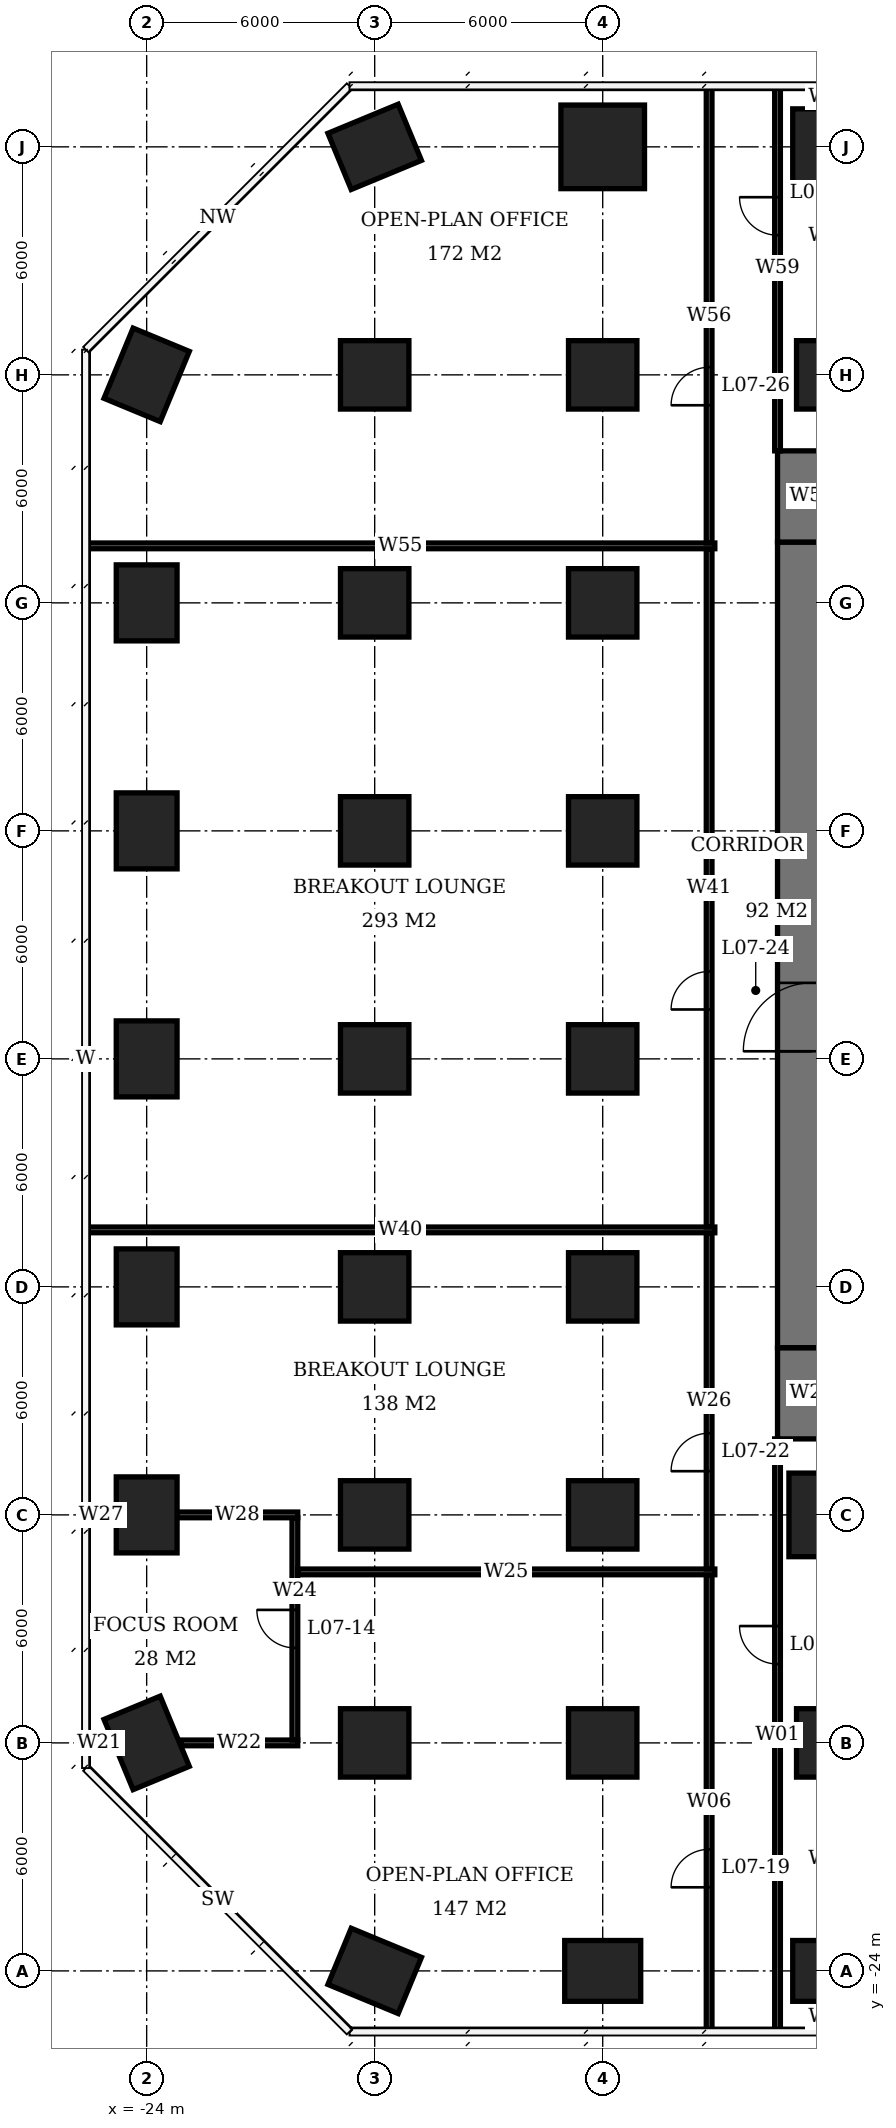
"""IFC4 building model, lengths in metres.
Left out: names, types, materials, properties, quantities, classifications, styles, units other than length and angle.
Written with IfcOpenShell. Run it as: python <this file> out.ifc"""

import sys

from ifc_helpers import new_model, si_unit, direction, frame, frame_2d, origin, origin_2d, place, context, subcontext, project, spatial, rectangle, extrude, element, fill, save


model = new_model("IFC4")
c1 = context("Model", 3, precision=1e-05, world=origin(), true_north=direction((0.0, 1.0)))
c2 = subcontext(c1, "Body", "Model", "MODEL_VIEW")
j1 = project(units=[si_unit("LENGTHUNIT", "METRE"), si_unit("PLANEANGLEUNIT", "RADIAN")], contexts=[c1])
p1 = place(None, origin())
s1 = spatial("IfcSite", under=j1, at=p1, CompositionType="ELEMENT")
p2 = place(p1, origin())
s2 = spatial("IfcBuilding", under=s1, at=p2, CompositionType="ELEMENT")
p3 = place(p2, frame((0.0, 0.0, 33.8)))
s3 = spatial("IfcBuildingStorey", under=s2, at=p3, CompositionType="ELEMENT", Elevation=33.8)
for number, where, z_axis, x_axis in (
    (1, (-24.0, -18.0, 0.0), (0.0, 0.0, 1.0), (-0.383, 0.924, 0.0)),
    (2, (-24.0, -12.0, 0.0), (0.0, 0.0, 1.0), (0.0, 1.0, 0.0)),
    (3, (-24.0, -6.0, 0.0), (0.0, 0.0, 1.0), (0.0, 1.0, 0.0)),
    (4, (-24.0, 0.0, 0.0), (0.0, 0.0, 1.0), (0.0, 1.0, 0.0)),
    (5, (-24.0, 6.0, 0.0), (0.0, 0.0, 1.0), (0.0, 1.0, 0.0)),
    (6, (-24.0, 12.0, 0.0), (0.0, 0.0, 1.0), (0.0, 1.0, 0.0)),
    (7, (-24.0, 18.0, 0.0), (0.0, 0.0, 1.0), (0.383, 0.924, 0.0)),
    (8, (-18.0, -24.0, 0.0), (0.0, 0.0, 1.0), (-0.924, 0.383, 0.0)),
):
    element("IfcColumn", number, at=place(p3, frame(where, z_axis=z_axis, x_axis=x_axis)), inside=s3, PredefinedType="COLUMN", context=c2, shape_type="SweptSolid", body=[
        extrude(rectangle(XDim=2.0, YDim=1.6, at=origin_2d()), origin(), (0.0, 0.0, 1.0), 3.9),
    ])
for number, where, z_axis, x_axis in (
    (9, (-18.0, -18.0, 0.0), (0.0, 0.0, 1.0), (1.0, 0.0, 0.0)),
    (10, (-18.0, -12.0, 0.0), (0.0, 0.0, 1.0), (1.0, 0.0, 0.0)),
    (11, (-18.0, -6.0, 0.0), (0.0, 0.0, 1.0), (1.0, 0.0, 0.0)),
    (12, (-18.0, 0.0, 0.0), (0.0, 0.0, 1.0), (1.0, 0.0, 0.0)),
    (13, (-18.0, 6.0, 0.0), (0.0, 0.0, 1.0), (1.0, 0.0, 0.0)),
    (14, (-18.0, 12.0, 0.0), (0.0, 0.0, 1.0), (1.0, 0.0, 0.0)),
    (15, (-18.0, 18.0, 0.0), (0.0, 0.0, 1.0), (1.0, 0.0, 0.0)),
):
    element("IfcColumn", number, at=place(p3, frame(where, z_axis=z_axis, x_axis=x_axis)), inside=s3, PredefinedType="COLUMN", context=c2, shape_type="SweptSolid", body=[
        extrude(rectangle(XDim=1.8, YDim=1.8, at=origin_2d()), origin(), (0.0, 0.0, 1.0), 3.9),
    ])
for number, where, z_axis, x_axis in (
    (16, (-18.0, 24.0, 0.0), (0.0, 0.0, 1.0), (0.924, 0.383, 0.0)),
    (17, (-12.0, -24.0, 0.0), (0.0, 0.0, 1.0), (1.0, 0.0, 0.0)),
):
    element("IfcColumn", number, at=place(p3, frame(where, z_axis=z_axis, x_axis=x_axis)), inside=s3, PredefinedType="COLUMN", context=c2, shape_type="SweptSolid", body=[
        extrude(rectangle(XDim=2.0, YDim=1.6, at=origin_2d()), origin(), (0.0, 0.0, 1.0), 3.9),
    ])
for number, where, z_axis, x_axis in (
    (18, (-12.0, -18.0, 0.0), (0.0, 0.0, 1.0), (1.0, 0.0, 0.0)),
    (19, (-12.0, -12.0, 0.0), (0.0, 0.0, 1.0), (1.0, 0.0, 0.0)),
    (20, (-12.0, -6.0, 0.0), (0.0, 0.0, 1.0), (1.0, 0.0, 0.0)),
    (21, (-12.0, 0.0, 0.0), (0.0, 0.0, 1.0), (1.0, 0.0, 0.0)),
    (22, (-12.0, 6.0, 0.0), (0.0, 0.0, 1.0), (1.0, 0.0, 0.0)),
    (23, (-12.0, 12.0, 0.0), (0.0, 0.0, 1.0), (1.0, 0.0, 0.0)),
    (24, (-12.0, 18.0, 0.0), (0.0, 0.0, 1.0), (1.0, 0.0, 0.0)),
):
    element("IfcColumn", number, at=place(p3, frame(where, z_axis=z_axis, x_axis=x_axis)), inside=s3, PredefinedType="COLUMN", context=c2, shape_type="SweptSolid", body=[
        extrude(rectangle(XDim=1.8, YDim=1.8, at=origin_2d()), origin(), (0.0, 0.0, 1.0), 3.9),
    ])
p4 = place(p3, frame((-12.0, 24.0, 0.0), z_axis=(0.0, 0.0, 1.0), x_axis=(1.0, 0.0, 0.0)))
e25 = element("IfcColumn", 25, at=p4, inside=s3, PredefinedType="COLUMN", context=c2, shape_type="SweptSolid", body=[
    extrude(rectangle(XDim=2.2, YDim=2.2, at=origin_2d()), origin(), (0.0, 0.0, 1.0), 3.9),
])
p5 = place(p3, frame((-6.0, -24.0, 0.0), z_axis=(0.0, 0.0, 1.0), x_axis=(1.0, 0.0, 0.0)))
e26 = element("IfcColumn", 26, at=p5, inside=s3, PredefinedType="COLUMN", context=c2, shape_type="SweptSolid", body=[
    extrude(rectangle(XDim=2.0, YDim=1.6, at=origin_2d()), origin(), (0.0, 0.0, 1.0), 3.9),
])
p6 = place(p3, frame((-6.0, -18.0, 0.0), z_axis=(0.0, 0.0, 1.0), x_axis=(1.0, 0.0, 0.0)))
e27 = element("IfcColumn", 27, at=p6, inside=s3, PredefinedType="COLUMN", context=c2, shape_type="SweptSolid", body=[
    extrude(rectangle(XDim=1.8, YDim=1.8, at=origin_2d()), origin(), (0.0, 0.0, 1.0), 3.9),
])
p7 = place(p3, frame((-6.0, -12.0, 0.0), z_axis=(0.0, 0.0, 1.0), x_axis=(1.0, 0.0, 0.0)))
e28 = element("IfcColumn", 28, at=p7, inside=s3, PredefinedType="COLUMN", context=c2, shape_type="SweptSolid", body=[
    extrude(rectangle(XDim=2.2, YDim=2.2, at=origin_2d()), origin(), (0.0, 0.0, 1.0), 3.9),
])
p8 = place(p3, frame((-6.0, 18.0, 0.0), z_axis=(0.0, 0.0, 1.0), x_axis=(1.0, 0.0, 0.0)))
e29 = element("IfcColumn", 29, at=p8, inside=s3, PredefinedType="COLUMN", context=c2, shape_type="SweptSolid", body=[
    extrude(rectangle(XDim=1.8, YDim=1.8, at=origin_2d()), origin(), (0.0, 0.0, 1.0), 3.9),
])
p9 = place(p3, frame((-6.0, 24.0, 0.0), z_axis=(0.0, 0.0, 1.0), x_axis=(1.0, 0.0, 0.0)))
e30 = element("IfcColumn", 30, at=p9, inside=s3, PredefinedType="COLUMN", context=c2, shape_type="SweptSolid", body=[
    extrude(rectangle(XDim=2.0, YDim=2.0, at=origin_2d()), origin(), (0.0, 0.0, 1.0), 3.9),
])
p10 = place(p3, frame((-6.5, -7.6, 0.0), z_axis=(0.0, 0.0, 1.0), x_axis=(0.0, 1.0, 0.0)))
e31 = element("IfcWall", 31, at=p10, inside=s3, PredefinedType="SHEAR", context=c2, shape_type="SweptSolid", body=[
    extrude(rectangle(XDim=21.2, YDim=1.8, at=frame_2d((10.6, 0.0))), origin(), (0.0, 0.0, 1.0), 3.9),
])
p11 = place(p10, frame((7.8, 0.0, 0.0)))
e32 = element("IfcOpeningElement", 32, at=p11, cuts=e31, PredefinedType="OPENING", context=c2, shape_type="SweptSolid", body=[
    extrude(rectangle(XDim=1.8, YDim=2.4, at=frame_2d((0.9, 1.2))), frame((0.0, 0.91, 0.0), z_axis=(0.0, -1.0, 0.0), x_axis=(1.0, 0.0, 0.0)), (0.0, 0.0, 1.0), 1.82),
])
for number, where, z_axis, x_axis in (
    (33, (-6.5, -10.0, 0.0), (0.0, 0.0, 1.0), (0.0, 1.0, 0.0)),
    (34, (-6.5, 13.6, 0.0), (0.0, 0.0, 1.0), (0.0, 1.0, 0.0)),
):
    element("IfcWall", number, at=place(p3, frame(where, z_axis=z_axis, x_axis=x_axis)), inside=s3, PredefinedType="SHEAR", context=c2, shape_type="SweptSolid", body=[
        extrude(rectangle(XDim=2.4, YDim=1.8, at=frame_2d((1.2, 0.0))), origin(), (0.0, 0.0, 1.0), 3.9),
    ])
p12 = place(p3, frame((-25.6, -18.0, 0.0), z_axis=(0.0, 0.0, 1.0), x_axis=(1.0, 0.0, 0.0)))
e35 = element("IfcWall", 35, at=p12, inside=s3, PredefinedType="PARTITIONING", context=c2, shape_type="SweptSolid", body=[
    extrude(rectangle(XDim=0.703, YDim=0.15, at=frame_2d((0.352, 0.0))), origin(), (0.0, 0.0, 1.0), 3.65),
])
p13 = place(p3, frame((-23.103, -18.0, 0.0), z_axis=(0.0, 0.0, 1.0), x_axis=(1.0, 0.0, 0.0)))
e36 = element("IfcWall", 36, at=p13, inside=s3, PredefinedType="PARTITIONING", context=c2, shape_type="SweptSolid", body=[
    extrude(rectangle(XDim=3.078, YDim=0.15, at=frame_2d((1.539, 0.0))), origin(), (0.0, 0.0, 1.0), 3.65),
])
p14 = place(p3, frame((-25.6, -12.0, 0.0), z_axis=(0.0, 0.0, 1.0), x_axis=(1.0, 0.0, 0.0)))
e37 = element("IfcWall", 37, at=p14, inside=s3, PredefinedType="PARTITIONING", context=c2, shape_type="SweptSolid", body=[
    extrude(rectangle(XDim=0.8, YDim=0.15, at=frame_2d((0.4, 0.0))), origin(), (0.0, 0.0, 1.0), 3.65),
])
p15 = place(p3, frame((-23.2, -12.0, 0.0), z_axis=(0.0, 0.0, 1.0), x_axis=(1.0, 0.0, 0.0)))
e38 = element("IfcWall", 38, at=p15, inside=s3, PredefinedType="PARTITIONING", context=c2, shape_type="SweptSolid", body=[
    extrude(rectangle(XDim=3.175, YDim=0.15, at=frame_2d((1.587, 0.0))), origin(), (0.0, 0.0, 1.0), 3.65),
])
p16 = place(p3, frame((-20.1, -17.925, 0.0), z_axis=(0.0, 0.0, 1.0), x_axis=(0.0, 1.0, 0.0)))
e39 = element("IfcWall", 39, at=p16, inside=s3, PredefinedType="PARTITIONING", context=c2, shape_type="SweptSolid", body=[
    extrude(rectangle(XDim=5.85, YDim=0.15, at=frame_2d((2.925, 0.0))), origin(), (0.0, 0.0, 1.0), 3.65),
])
p17 = place(p16, frame((2.425, 0.0, 0.0)))
e40 = element("IfcOpeningElement", 40, at=p17, cuts=e39, PredefinedType="OPENING", context=c2, shape_type="SweptSolid", body=[
    extrude(rectangle(XDim=1.0, YDim=2.1, at=frame_2d((0.5, 1.05))), frame((0.0, 0.085, 0.0), z_axis=(0.0, -1.0, 0.0), x_axis=(1.0, 0.0, 0.0)), (0.0, 0.0, 1.0), 0.17),
])
for number, where, z_axis, x_axis in (
    (41, (-25.6, -4.5, 0.0), (0.0, 0.0, 1.0), (1.0, 0.0, 0.0)),
    (42, (-25.6, 13.5, 0.0), (0.0, 0.0, 1.0), (1.0, 0.0, 0.0)),
):
    element("IfcWall", number, at=place(p3, frame(where, z_axis=z_axis, x_axis=x_axis)), inside=s3, PredefinedType="PARTITIONING", context=c2, shape_type="SweptSolid", body=[
        extrude(rectangle(XDim=16.55, YDim=0.15, at=frame_2d((8.275, 0.0))), origin(), (0.0, 0.0, 1.0), 3.65),
    ])
p18 = place(p3, frame((-20.025, -13.5, 0.0), z_axis=(0.0, 0.0, 1.0), x_axis=(1.0, 0.0, 0.0)))
e43 = element("IfcWall", 43, at=p18, inside=s3, PredefinedType="PARTITIONING", context=c2, shape_type="SweptSolid", body=[
    extrude(rectangle(XDim=10.975, YDim=0.15, at=frame_2d((5.487, 0.0))), origin(), (0.0, 0.0, 1.0), 3.65),
])
p19 = place(p3, frame((-9.2, -25.55, 0.0), z_axis=(0.0, 0.0, 1.0), x_axis=(0.0, 1.0, 0.0)))
e44 = element("IfcWall", 44, at=p19, inside=s3, PredefinedType="PARTITIONING", context=c2, shape_type="SweptSolid", body=[
    extrude(rectangle(XDim=11.975, YDim=0.15, at=frame_2d((5.988, 0.0))), origin(), (0.0, 0.0, 1.0), 3.65),
])
p20 = place(p19, frame((3.75, 0.0, 0.0)))
e45 = element("IfcOpeningElement", 45, at=p20, cuts=e44, PredefinedType="OPENING", context=c2, shape_type="SweptSolid", body=[
    extrude(rectangle(XDim=1.0, YDim=2.1, at=frame_2d((0.5, 1.05))), frame((0.0, 0.085, 0.0), z_axis=(0.0, -1.0, 0.0), x_axis=(1.0, 0.0, 0.0)), (0.0, 0.0, 1.0), 0.17),
])
p21 = place(p3, frame((-9.2, -13.425, 0.0), z_axis=(0.0, 0.0, 1.0), x_axis=(0.0, 1.0, 0.0)))
e46 = element("IfcWall", 46, at=p21, inside=s3, PredefinedType="PARTITIONING", context=c2, shape_type="SweptSolid", body=[
    extrude(rectangle(XDim=8.85, YDim=0.15, at=frame_2d((4.425, 0.0))), origin(), (0.0, 0.0, 1.0), 3.65),
])
p22 = place(p21, frame((2.575, 0.0, 0.0)))
e47 = element("IfcOpeningElement", 47, at=p22, cuts=e46, PredefinedType="OPENING", context=c2, shape_type="SweptSolid", body=[
    extrude(rectangle(XDim=1.0, YDim=2.1, at=frame_2d((0.5, 1.05))), frame((0.0, 0.085, 0.0), z_axis=(0.0, -1.0, 0.0), x_axis=(1.0, 0.0, 0.0)), (0.0, 0.0, 1.0), 0.17),
])
p23 = place(p3, frame((-9.2, -4.425, 0.0), z_axis=(0.0, 0.0, 1.0), x_axis=(0.0, 1.0, 0.0)))
e48 = element("IfcWall", 48, at=p23, inside=s3, PredefinedType="PARTITIONING", context=c2, shape_type="SweptSolid", body=[
    extrude(rectangle(XDim=17.85, YDim=0.15, at=frame_2d((8.925, 0.0))), origin(), (0.0, 0.0, 1.0), 3.65),
])
p24 = place(p23, frame((5.725, 0.0, 0.0)))
e49 = element("IfcOpeningElement", 49, at=p24, cuts=e48, PredefinedType="OPENING", context=c2, shape_type="SweptSolid", body=[
    extrude(rectangle(XDim=1.0, YDim=2.1, at=frame_2d((0.5, 1.05))), frame((0.0, 0.085, 0.0), z_axis=(0.0, -1.0, 0.0), x_axis=(1.0, 0.0, 0.0)), (0.0, 0.0, 1.0), 0.17),
])
p25 = place(p3, frame((-9.2, 13.575, 0.0), z_axis=(0.0, 0.0, 1.0), x_axis=(0.0, 1.0, 0.0)))
e50 = element("IfcWall", 50, at=p25, inside=s3, PredefinedType="PARTITIONING", context=c2, shape_type="SweptSolid", body=[
    extrude(rectangle(XDim=11.975, YDim=0.15, at=frame_2d((5.988, 0.0))), origin(), (0.0, 0.0, 1.0), 3.65),
])
p26 = place(p25, frame((3.625, 0.0, 0.0)))
e51 = element("IfcOpeningElement", 51, at=p26, cuts=e50, PredefinedType="OPENING", context=c2, shape_type="SweptSolid", body=[
    extrude(rectangle(XDim=1.0, YDim=2.1, at=frame_2d((0.5, 1.05))), frame((0.0, 0.085, 0.0), z_axis=(0.0, -1.0, 0.0), x_axis=(1.0, 0.0, 0.0)), (0.0, 0.0, 1.0), 0.17),
])
p27 = place(p3, frame((-7.4, -25.6, 0.0), z_axis=(0.0, 0.0, 1.0), x_axis=(0.0, 1.0, 0.0)))
e52 = element("IfcWall", 52, at=p27, inside=s3, PredefinedType="PARTITIONING", context=c2, shape_type="SweptSolid", body=[
    extrude(rectangle(XDim=15.6, YDim=0.15, at=frame_2d((7.8, 0.0))), origin(), (0.0, 0.0, 1.0), 3.65),
])
p28 = place(p27, frame((9.675, 0.0, 0.0)))
e53 = element("IfcOpeningElement", 53, at=p28, cuts=e52, PredefinedType="OPENING", context=c2, shape_type="SweptSolid", body=[
    extrude(rectangle(XDim=1.0, YDim=2.1, at=frame_2d((0.5, 1.05))), frame((0.0, 0.085, 0.0), z_axis=(0.0, -1.0, 0.0), x_axis=(1.0, 0.0, 0.0)), (0.0, 0.0, 1.0), 0.17),
])
p29 = place(p3, frame((-7.4, 16.0, 0.0), z_axis=(0.0, 0.0, 1.0), x_axis=(0.0, 1.0, 0.0)))
e54 = element("IfcWall", 54, at=p29, inside=s3, PredefinedType="PARTITIONING", context=c2, shape_type="SweptSolid", body=[
    extrude(rectangle(XDim=9.6, YDim=0.15, at=frame_2d((4.8, 0.0))), origin(), (0.0, 0.0, 1.0), 3.65),
])
p30 = place(p29, frame((5.675, 0.0, 0.0)))
e55 = element("IfcOpeningElement", 55, at=p30, cuts=e54, PredefinedType="OPENING", context=c2, shape_type="SweptSolid", body=[
    extrude(rectangle(XDim=1.0, YDim=2.1, at=frame_2d((0.5, 1.05))), frame((0.0, 0.085, 0.0), z_axis=(0.0, -1.0, 0.0), x_axis=(1.0, 0.0, 0.0)), (0.0, 0.0, 1.0), 0.17),
])
p31 = place(p11, origin())
e56 = element("IfcDoor", 56, at=p31, inside=s3, OperationType="DOUBLE_DOOR_SINGLE_SWING", PredefinedType="DOOR", context=c2, shape_type="SweptSolid", body=[
    extrude(rectangle(XDim=1.8, YDim=2.4, at=frame_2d((0.9, 1.2))), frame((0.0, 0.025, 0.0), z_axis=(0.0, -1.0, 0.0), x_axis=(1.0, 0.0, 0.0)), (0.0, 0.0, 1.0), 0.05),
])
fill(e32, e56)
p32 = place(p17, origin())
e57 = element("IfcDoor", 57, at=p32, inside=s3, OperationType="SINGLE_SWING_RIGHT", PredefinedType="DOOR", context=c2, shape_type="SweptSolid", body=[
    extrude(rectangle(XDim=1.0, YDim=2.1, at=frame_2d((0.5, 1.05))), frame((0.0, 0.025, 0.0), z_axis=(0.0, -1.0, 0.0), x_axis=(1.0, 0.0, 0.0)), (0.0, 0.0, 1.0), 0.05),
])
fill(e40, e57)
p33 = place(p20, origin())
e58 = element("IfcDoor", 58, at=p33, inside=s3, OperationType="SINGLE_SWING_LEFT", PredefinedType="DOOR", context=c2, shape_type="SweptSolid", body=[
    extrude(rectangle(XDim=1.0, YDim=2.1, at=frame_2d((0.5, 1.05))), frame((0.0, 0.025, 0.0), z_axis=(0.0, -1.0, 0.0), x_axis=(1.0, 0.0, 0.0)), (0.0, 0.0, 1.0), 0.05),
])
fill(e45, e58)
p34 = place(p28, origin())
e59 = element("IfcDoor", 59, at=p34, inside=s3, OperationType="SINGLE_SWING_RIGHT", PredefinedType="DOOR", context=c2, shape_type="SweptSolid", body=[
    extrude(rectangle(XDim=1.0, YDim=2.1, at=frame_2d((0.5, 1.05))), frame((0.0, 0.025, 0.0), z_axis=(0.0, -1.0, 0.0), x_axis=(1.0, 0.0, 0.0)), (0.0, 0.0, 1.0), 0.05),
])
fill(e53, e59)
p35 = place(p22, origin())
e60 = element("IfcDoor", 60, at=p35, inside=s3, OperationType="SINGLE_SWING_LEFT", PredefinedType="DOOR", context=c2, shape_type="SweptSolid", body=[
    extrude(rectangle(XDim=1.0, YDim=2.1, at=frame_2d((0.5, 1.05))), frame((0.0, 0.025, 0.0), z_axis=(0.0, -1.0, 0.0), x_axis=(1.0, 0.0, 0.0)), (0.0, 0.0, 1.0), 0.05),
])
fill(e47, e60)
p36 = place(p24, origin())
e61 = element("IfcDoor", 61, at=p36, inside=s3, OperationType="SINGLE_SWING_LEFT", PredefinedType="DOOR", context=c2, shape_type="SweptSolid", body=[
    extrude(rectangle(XDim=1.0, YDim=2.1, at=frame_2d((0.5, 1.05))), frame((0.0, 0.025, 0.0), z_axis=(0.0, -1.0, 0.0), x_axis=(1.0, 0.0, 0.0)), (0.0, 0.0, 1.0), 0.05),
])
fill(e49, e61)
p37 = place(p30, origin())
e62 = element("IfcDoor", 62, at=p37, inside=s3, OperationType="SINGLE_SWING_RIGHT", PredefinedType="DOOR", context=c2, shape_type="SweptSolid", body=[
    extrude(rectangle(XDim=1.0, YDim=2.1, at=frame_2d((0.5, 1.05))), frame((0.0, 0.025, 0.0), z_axis=(0.0, -1.0, 0.0), x_axis=(1.0, 0.0, 0.0)), (0.0, 0.0, 1.0), 0.05),
])
fill(e55, e62)
p38 = place(p26, origin())
e63 = element("IfcDoor", 63, at=p38, inside=s3, OperationType="SINGLE_SWING_LEFT", PredefinedType="DOOR", context=c2, shape_type="SweptSolid", body=[
    extrude(rectangle(XDim=1.0, YDim=2.1, at=frame_2d((0.5, 1.05))), frame((0.0, 0.025, 0.0), z_axis=(0.0, -1.0, 0.0), x_axis=(1.0, 0.0, 0.0)), (0.0, 0.0, 1.0), 0.05),
])
fill(e51, e63)
save(model, sys.argv[1])
